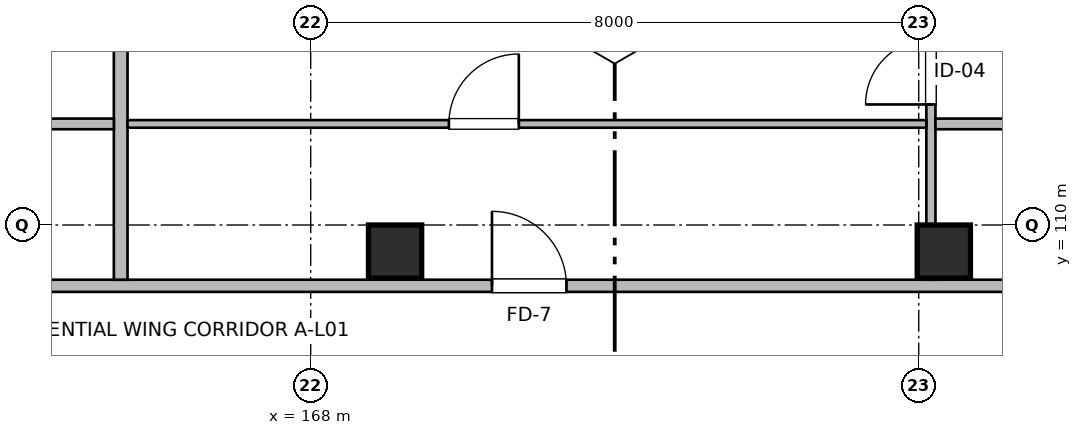
"""IFC4 building model, lengths in metres.
Left out: names, types, materials, properties, quantities, classifications, styles, units other than length and angle.
Written with IfcOpenShell. Run it as: python <this file> out.ifc"""

import sys

from ifc_helpers import new_model, si_unit, direction, frame, frame_2d, origin, origin_2d, place, context, subcontext, project, spatial, rectangle, extrude, element, fill, save


model = new_model("IFC4")
c1 = context("Model", 3, precision=1e-05, world=origin(), true_north=direction((0.0, 1.0)))
c2 = subcontext(c1, "Body", "Model", "MODEL_VIEW")
j1 = project(units=[si_unit("LENGTHUNIT", "METRE"), si_unit("PLANEANGLEUNIT", "RADIAN")], contexts=[c1])
p1 = place(None, origin())
s1 = spatial("IfcSite", under=j1, at=p1, CompositionType="ELEMENT")
p2 = place(p1, origin())
s2 = spatial("IfcBuilding", under=s1, at=p2, CompositionType="ELEMENT")
p3 = place(p2, frame((0.0, 0.0, 4.16)))
s3 = spatial("IfcBuildingStorey", under=s2, at=p3, CompositionType="ELEMENT", Elevation=4.16)
for number, where, z_axis, x_axis in (
    (1, (169.11, 109.65, 0.0), (0.0, 0.0, 1.0), (1.0, 0.0, 0.0)),
    (2, (176.33, 109.65, 0.0), (0.0, 0.0, 1.0), (1.0, 0.0, 0.0)),
):
    element("IfcColumn", number, at=place(p3, frame(where, z_axis=z_axis, x_axis=x_axis)), inside=s3, PredefinedType="COLUMN", context=c2, shape_type="SweptSolid", body=[
        extrude(rectangle(XDim=0.7, YDim=0.7, at=origin_2d()), origin(), (0.0, 0.0, 1.0), 3.2),
    ])
p4 = place(p3, frame((147.18, 109.2, 0.0), z_axis=(0.0, 0.0, 1.0), x_axis=(1.0, 0.0, 0.0)))
e3 = element("IfcWall", 3, at=p4, inside=s3, PredefinedType="PARTITIONING", context=c2, shape_type="SweptSolid", body=[
    extrude(rectangle(XDim=36.64, YDim=0.16, at=frame_2d((18.32, 0.0))), origin(), (0.0, 0.0, 1.0), 2.935),
])
p5 = place(p4, frame((4.795, 0.0, 0.0)))
e4 = element("IfcOpeningElement", 4, at=p5, cuts=e3, PredefinedType="OPENING", context=c2, shape_type="SweptSolid", body=[
    extrude(rectangle(XDim=0.98, YDim=2.15, at=frame_2d((0.49, 1.075))), frame((0.0, 0.09, 0.0), z_axis=(0.0, -1.0, 0.0), x_axis=(1.0, 0.0, 0.0)), (0.0, 0.0, 1.0), 0.18),
])
p6 = place(p4, frame((23.205, 0.0, 0.0)))
e5 = element("IfcOpeningElement", 5, at=p6, cuts=e3, PredefinedType="OPENING", context=c2, shape_type="SweptSolid", body=[
    extrude(rectangle(XDim=0.98, YDim=2.15, at=frame_2d((0.49, 1.075))), frame((0.0, 0.09, 0.0), z_axis=(0.0, -1.0, 0.0), x_axis=(1.0, 0.0, 0.0)), (0.0, 0.0, 1.0), 0.18),
])
p7 = place(p3, frame((165.5, 109.28, 0.0), z_axis=(0.0, 0.0, 1.0), x_axis=(0.0, 1.0, 0.0)))
e6 = element("IfcWall", 6, at=p7, inside=s3, PredefinedType="PARTITIONING", context=c2, shape_type="SweptSolid", body=[
    extrude(rectangle(XDim=6.59, YDim=0.18, at=frame_2d((3.295, 0.0))), origin(), (0.0, 0.0, 1.0), 2.67),
])
p8 = place(p3, frame((157.81, 111.33, 0.0), z_axis=(0.0, 0.0, 1.0), x_axis=(1.0, 0.0, 0.0)))
e7 = element("IfcWall", 7, at=p8, inside=s3, PredefinedType="PARTITIONING", context=c2, shape_type="SweptSolid", body=[
    extrude(rectangle(XDim=7.6, YDim=0.14, at=frame_2d((3.8, 0.0))), origin(), (0.0, 0.0, 1.0), 2.935),
])
p9 = place(p8, frame((2.264, 0.0, 0.0)))
e8 = element("IfcOpeningElement", 8, at=p9, cuts=e7, PredefinedType="OPENING", context=c2, shape_type="SweptSolid", body=[
    extrude(rectangle(XDim=0.85, YDim=2.05, at=frame_2d((0.425, 1.025))), frame((0.0, 0.08, 0.0), z_axis=(0.0, -1.0, 0.0), x_axis=(1.0, 0.0, 0.0)), (0.0, 0.0, 1.0), 0.16),
])
p10 = place(p3, frame((176.16, 109.28, 0.0), z_axis=(0.0, 0.0, 1.0), x_axis=(0.0, 1.0, 0.0)))
e9 = element("IfcWall", 9, at=p10, inside=s3, PredefinedType="PARTITIONING", context=c2, shape_type="SweptSolid", body=[
    extrude(rectangle(XDim=6.59, YDim=0.12, at=frame_2d((3.295, 0.0))), origin(), (0.0, 0.0, 1.0), 2.58),
])
p11 = place(p10, frame((2.306, 0.0, 0.0)))
e10 = element("IfcOpeningElement", 10, at=p11, cuts=e9, PredefinedType="OPENING", context=c2, shape_type="SweptSolid", body=[
    extrude(rectangle(XDim=0.86, YDim=2.1, at=frame_2d((0.43, 1.05))), frame((0.0, 0.07, 0.0), z_axis=(0.0, -1.0, 0.0), x_axis=(1.0, 0.0, 0.0)), (0.0, 0.0, 1.0), 0.14),
])
p12 = place(p10, frame((4.093, 0.0, 0.0)))
e11 = element("IfcOpeningElement", 11, at=p12, cuts=e9, PredefinedType="OPENING", context=c2, shape_type="SweptSolid", body=[
    extrude(rectangle(XDim=0.9, YDim=2.1, at=frame_2d((0.45, 1.05))), frame((0.0, 0.07, 0.0), z_axis=(0.0, -1.0, 0.0), x_axis=(1.0, 0.0, 0.0)), (0.0, 0.0, 1.0), 0.14),
])
p13 = place(p3, frame((176.22, 111.33, 0.0), z_axis=(0.0, 0.0, 1.0), x_axis=(1.0, 0.0, 0.0)))
e12 = element("IfcWall", 12, at=p13, inside=s3, PredefinedType="PARTITIONING", context=c2, shape_type="SweptSolid", body=[
    extrude(rectangle(XDim=7.6, YDim=0.14, at=frame_2d((3.8, 0.0))), origin(), (0.0, 0.0, 1.0), 2.935),
])
p14 = place(p13, frame((3.064, 0.0, 0.0)))
e13 = element("IfcOpeningElement", 13, at=p14, cuts=e12, PredefinedType="OPENING", context=c2, shape_type="SweptSolid", body=[
    extrude(rectangle(XDim=0.85, YDim=2.05, at=frame_2d((0.425, 1.025))), frame((0.0, 0.08, 0.0), z_axis=(0.0, -1.0, 0.0), x_axis=(1.0, 0.0, 0.0)), (0.0, 0.0, 1.0), 0.16),
])
p15 = place(p3, frame((165.59, 111.33, 0.0), z_axis=(0.0, 0.0, 1.0), x_axis=(1.0, 0.0, 0.0)))
e14 = element("IfcWall", 14, at=p15, inside=s3, PredefinedType="PARTITIONING", context=c2, shape_type="SweptSolid", body=[
    extrude(rectangle(XDim=10.51, YDim=0.1, at=frame_2d((5.255, 0.0))), origin(), (0.0, 0.0, 1.0), 2.935),
])
p16 = place(p15, frame((4.228, 0.0, 0.0)))
e15 = element("IfcOpeningElement", 15, at=p16, cuts=e14, PredefinedType="OPENING", context=c2, shape_type="SweptSolid", body=[
    extrude(rectangle(XDim=0.92, YDim=2.1, at=frame_2d((0.46, 1.05))), frame((0.0, 0.06, 0.0), z_axis=(0.0, -1.0, 0.0), x_axis=(1.0, 0.0, 0.0)), (0.0, 0.0, 1.0), 0.12),
])
p17 = place(p6, origin())
e16 = element("IfcDoor", 16, at=p17, inside=s3, OperationType="SINGLE_SWING_LEFT", PredefinedType="DOOR", context=c2, shape_type="SweptSolid", body=[
    extrude(rectangle(XDim=0.98, YDim=2.15, at=frame_2d((0.49, 1.075))), frame((0.0, 0.025, 0.0), z_axis=(0.0, -1.0, 0.0), x_axis=(1.0, 0.0, 0.0)), (0.0, 0.0, 1.0), 0.05),
])
fill(e5, e16)
p18 = place(p16, origin())
e17 = element("IfcDoor", 17, at=p18, inside=s3, OperationType="SINGLE_SWING_RIGHT", PredefinedType="DOOR", context=c2, shape_type="SweptSolid", body=[
    extrude(rectangle(XDim=0.92, YDim=2.1, at=frame_2d((0.46, 1.05))), frame((0.0, 0.025, 0.0), z_axis=(0.0, -1.0, 0.0), x_axis=(1.0, 0.0, 0.0)), (0.0, 0.0, 1.0), 0.05),
])
fill(e15, e17)
p19 = place(p11, origin())
e18 = element("IfcDoor", 18, at=p19, inside=s3, OperationType="SINGLE_SWING_LEFT", PredefinedType="DOOR", context=c2, shape_type="SweptSolid", body=[
    extrude(rectangle(XDim=0.86, YDim=2.1, at=frame_2d((0.43, 1.05))), frame((0.0, 0.025, 0.0), z_axis=(0.0, -1.0, 0.0), x_axis=(1.0, 0.0, 0.0)), (0.0, 0.0, 1.0), 0.05),
])
fill(e10, e18)
save(model, sys.argv[1])
